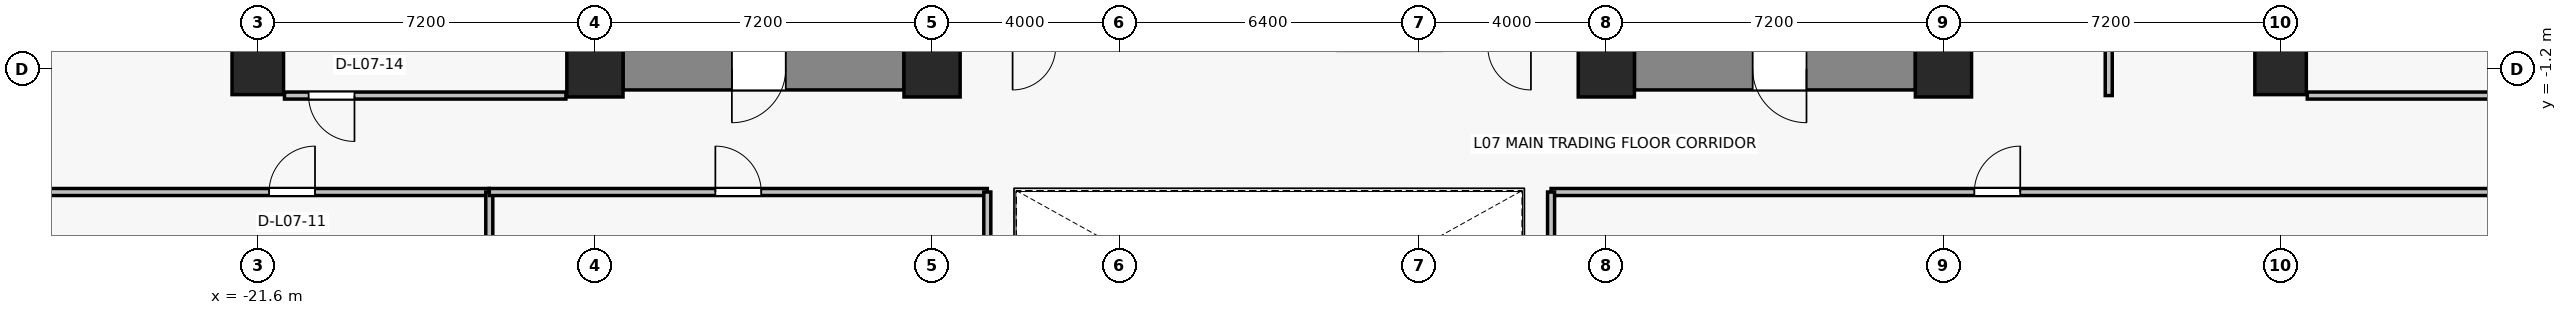
"""IFC4 building model, lengths in metres.
Left out: names, types, materials, properties, quantities, classifications, styles, units other than length and angle.
Written with IfcOpenShell. Run it as: python <this file> out.ifc"""

import sys

from ifc_helpers import new_model, si_unit, direction, frame, frame_2d, origin, origin_2d, place, context, subcontext, project, spatial, rectangle, extrude, source, transform, mapped, element, fill, save


model = new_model("IFC4")
c1 = context("Model", 3, precision=1e-05, world=origin(), true_north=direction((0.0, 1.0)))
c2 = subcontext(c1, "Body", "Model", "MODEL_VIEW")
j1 = project(units=[si_unit("LENGTHUNIT", "METRE"), si_unit("PLANEANGLEUNIT", "RADIAN")], contexts=[c1])
p1 = place(None, origin())
s1 = spatial("IfcSite", under=j1, at=p1, CompositionType="ELEMENT")
p2 = place(p1, origin())
s2 = spatial("IfcBuilding", under=s1, at=p2, CompositionType="ELEMENT")
p3 = place(p2, frame((0.0, 0.0, 30.7)))
s3 = spatial("IfcBuildingStorey", under=s2, at=p3, CompositionType="ELEMENT", Elevation=30.7)
for number, where, z_axis, x_axis in (
    (1, (-14.4, -1.2, 0.0), (0.0, 0.0, 1.0), (1.0, 0.0, 0.0)),
    (2, (-7.2, -1.2, 0.0), (0.0, 0.0, 1.0), (1.0, 0.0, 0.0)),
    (3, (7.2, -1.2, 0.0), (0.0, 0.0, 1.0), (1.0, 0.0, 0.0)),
    (4, (14.4, -1.2, 0.0), (0.0, 0.0, 1.0), (1.0, 0.0, 0.0)),
):
    element("IfcColumn", number, at=place(p3, frame(where, z_axis=z_axis, x_axis=x_axis)), inside=s3, PredefinedType="COLUMN", context=c2, shape_type="SweptSolid", body=[
        extrude(rectangle(XDim=1.2, YDim=1.2, at=origin_2d()), origin(), (0.0, 0.0, 1.0), 3.3),
    ])
for number, where, z_axis, x_axis in (
    (5, (-21.6, -1.2, 0.0), (0.0, 0.0, 1.0), (1.0, 0.0, 0.0)),
    (6, (21.6, -1.2, 0.0), (0.0, 0.0, 1.0), (1.0, 0.0, 0.0)),
):
    element("IfcColumn", number, at=place(p3, frame(where, z_axis=z_axis, x_axis=x_axis)), inside=s3, PredefinedType="COLUMN", context=c2, shape_type="SweptSolid", body=[
        extrude(rectangle(XDim=1.1, YDim=1.1, at=origin_2d()), origin(), (0.0, 0.0, 1.0), 3.3),
    ])
p4 = place(p3, frame((-7.8, -1.2, 0.0), z_axis=(0.0, 0.0, 1.0), x_axis=(-1.0, 0.0, 0.0)))
e7 = element("IfcWall", 7, at=p4, inside=s3, PredefinedType="SHEAR", context=c2, shape_type="SweptSolid", body=[
    extrude(rectangle(XDim=6.0, YDim=0.9, at=frame_2d((3.0, 0.0))), origin(), (0.0, 0.0, 1.0), 3.075),
])
p5 = place(p4, frame((2.525, 0.0, 0.0)))
e8 = element("IfcOpeningElement", 8, at=p5, cuts=e7, PredefinedType="OPENING", context=c2, shape_type="SweptSolid", body=[
    extrude(rectangle(XDim=1.15, YDim=2.15, at=frame_2d((0.575, 1.075))), frame((0.0, 0.46, 0.0), z_axis=(0.0, -1.0, 0.0), x_axis=(1.0, 0.0, 0.0)), (0.0, 0.0, 1.0), 0.92),
])
p6 = place(p3, frame((13.8, -1.2, 0.0), z_axis=(0.0, 0.0, 1.0), x_axis=(-1.0, 0.0, 0.0)))
e9 = element("IfcWall", 9, at=p6, inside=s3, PredefinedType="SHEAR", context=c2, shape_type="SweptSolid", body=[
    extrude(rectangle(XDim=6.0, YDim=0.9, at=frame_2d((3.0, 0.0))), origin(), (0.0, 0.0, 1.0), 3.075),
])
p7 = place(p6, frame((2.325, 0.0, 0.0)))
e10 = element("IfcOpeningElement", 10, at=p7, cuts=e9, PredefinedType="OPENING", context=c2, shape_type="SweptSolid", body=[
    extrude(rectangle(XDim=1.15, YDim=2.15, at=frame_2d((0.575, 1.075))), frame((0.0, 0.46, 0.0), z_axis=(0.0, -1.0, 0.0), x_axis=(1.0, 0.0, 0.0)), (0.0, 0.0, 1.0), 0.92),
])
p8 = place(p3, frame((-32.53, -3.83, 0.0), z_axis=(0.0, 0.0, 1.0), x_axis=(1.0, 0.0, 0.0)))
e11 = element("IfcWall", 11, at=p8, inside=s3, PredefinedType="PARTITIONING", context=c2, shape_type="SweptSolid", body=[
    extrude(rectangle(XDim=15.874, YDim=0.15, at=frame_2d((7.937, 0.0))), origin(), (0.0, 0.0, 1.0), 2.465),
])
p9 = place(p8, frame((11.172, 0.0, 0.0)))
e12 = element("IfcOpeningElement", 12, at=p9, cuts=e11, PredefinedType="OPENING", context=c2, shape_type="SweptSolid", body=[
    extrude(rectangle(XDim=0.98, YDim=2.15, at=frame_2d((0.49, 1.075))), frame((0.0, 0.085, 0.0), z_axis=(0.0, -1.0, 0.0), x_axis=(1.0, 0.0, 0.0)), (0.0, 0.0, 1.0), 0.17),
])
p10 = place(p3, frame((-16.656, -3.83, 0.0), z_axis=(0.0, 0.0, 1.0), x_axis=(0.0, -1.0, 0.0)))
e13 = element("IfcWall", 13, at=p10, inside=s3, PredefinedType="PARTITIONING", context=c2, shape_type="SweptSolid", body=[
    extrude(rectangle(XDim=14.3, YDim=0.15, at=frame_2d((7.15, 0.0))), origin(), (0.0, 0.0, 1.0), 2.465),
])
p11 = place(p3, frame((-16.656, -3.83, 0.0), z_axis=(0.0, 0.0, 1.0), x_axis=(1.0, 0.0, 0.0)))
e14 = element("IfcWall", 14, at=p11, inside=s3, PredefinedType="PARTITIONING", context=c2, shape_type="SweptSolid", body=[
    extrude(rectangle(XDim=10.636, YDim=0.15, at=frame_2d((5.318, 0.0))), origin(), (0.0, 0.0, 1.0), 2.465),
])
p12 = place(p11, frame((4.828, 0.0, 0.0)))
e15 = element("IfcOpeningElement", 15, at=p12, cuts=e14, PredefinedType="OPENING", context=c2, shape_type="SweptSolid", body=[
    extrude(rectangle(XDim=0.98, YDim=2.15, at=frame_2d((0.49, 1.075))), frame((0.0, 0.085, 0.0), z_axis=(0.0, -1.0, 0.0), x_axis=(1.0, 0.0, 0.0)), (0.0, 0.0, 1.0), 0.17),
])
p13 = place(p3, frame((-6.02, -3.83, 0.0), z_axis=(0.0, 0.0, 1.0), x_axis=(0.0, -1.0, 0.0)))
e16 = element("IfcWall", 16, at=p13, inside=s3, PredefinedType="PARTITIONING", context=c2, shape_type="SweptSolid", body=[
    extrude(rectangle(XDim=14.3, YDim=0.15, at=frame_2d((7.15, 0.0))), origin(), (0.0, 0.0, 1.0), 2.465),
])
p14 = place(p3, frame((6.02, -3.83, 0.0), z_axis=(0.0, 0.0, 1.0), x_axis=(1.0, 0.0, 0.0)))
e17 = element("IfcWall", 17, at=p14, inside=s3, PredefinedType="PARTITIONING", context=c2, shape_type="SweptSolid", body=[
    extrude(rectangle(XDim=22.51, YDim=0.15, at=frame_2d((11.255, 0.0))), origin(), (0.0, 0.0, 1.0), 2.465),
])
p15 = place(p14, frame((9.04, 0.0, 0.0)))
e18 = element("IfcOpeningElement", 18, at=p15, cuts=e17, PredefinedType="OPENING", context=c2, shape_type="SweptSolid", body=[
    extrude(rectangle(XDim=0.98, YDim=2.15, at=frame_2d((0.49, 1.075))), frame((0.0, 0.085, 0.0), z_axis=(0.0, -1.0, 0.0), x_axis=(1.0, 0.0, 0.0)), (0.0, 0.0, 1.0), 0.17),
])
p16 = place(p3, frame((6.02, -18.13, 0.0), z_axis=(0.0, 0.0, 1.0), x_axis=(0.0, 1.0, 0.0)))
e19 = element("IfcWall", 19, at=p16, inside=s3, PredefinedType="PARTITIONING", context=c2, shape_type="SweptSolid", body=[
    extrude(rectangle(XDim=14.3, YDim=0.15, at=frame_2d((7.15, 0.0))), origin(), (0.0, 0.0, 1.0), 2.465),
])
p17 = place(p3, frame((-15.02, -1.77, 0.0), z_axis=(0.0, 0.0, 1.0), x_axis=(-1.0, 0.0, 0.0)))
e20 = element("IfcWall", 20, at=p17, inside=s3, PredefinedType="PARTITIONING", context=c2, shape_type="SweptSolid", body=[
    extrude(rectangle(XDim=6.01, YDim=0.15, at=frame_2d((3.005, 0.0))), origin(), (0.0, 0.0, 1.0), 3.075),
])
p18 = place(p17, frame((4.515, 0.0, 0.0)))
e21 = element("IfcOpeningElement", 21, at=p18, cuts=e20, PredefinedType="OPENING", context=c2, shape_type="SweptSolid", body=[
    extrude(rectangle(XDim=0.98, YDim=2.15, at=frame_2d((0.49, 1.075))), frame((0.0, 0.085, 0.0), z_axis=(0.0, -1.0, 0.0), x_axis=(1.0, 0.0, 0.0)), (0.0, 0.0, 1.0), 0.17),
])
p19 = place(p3, frame((28.53, -1.77, 0.0), z_axis=(0.0, 0.0, 1.0), x_axis=(-1.0, 0.0, 0.0)))
e22 = element("IfcWall", 22, at=p19, inside=s3, PredefinedType="PARTITIONING", context=c2, shape_type="SweptSolid", body=[
    extrude(rectangle(XDim=6.36, YDim=0.15, at=frame_2d((3.18, 0.0))), origin(), (0.0, 0.0, 1.0), 2.465),
])
p20 = place(p3, frame((17.93, -1.77, 0.0), z_axis=(0.0, 0.0, 1.0), x_axis=(0.0, 1.0, 0.0)))
e23 = element("IfcWall", 23, at=p20, inside=s3, PredefinedType="PARTITIONING", context=c2, shape_type="SweptSolid", body=[
    extrude(rectangle(XDim=6.292, YDim=0.15, at=frame_2d((3.146, 0.0))), origin(), (0.0, 0.0, 1.0), 2.465),
])
p21 = place(p20, frame((2.656, 0.0, 0.0)))
e24 = element("IfcOpeningElement", 24, at=p21, cuts=e23, PredefinedType="OPENING", context=c2, shape_type="SweptSolid", body=[
    extrude(rectangle(XDim=0.98, YDim=2.15, at=frame_2d((0.49, 1.075))), frame((0.0, 0.085, 0.0), z_axis=(0.0, -1.0, 0.0), x_axis=(1.0, 0.0, 0.0)), (0.0, 0.0, 1.0), 0.17),
])
m1 = source(origin(), c2, "Body", "SweptSolid", [
    extrude(rectangle(XDim=1.15, YDim=2.15, at=frame_2d((0.575, 1.075))), frame((0.0, 0.025, 0.0), z_axis=(0.0, -1.0, 0.0), x_axis=(1.0, 0.0, 0.0)), (0.0, 0.0, 1.0), 0.05),
])
p22 = place(p5, origin())
e25 = element("IfcDoor", 25, at=p22, inside=s3, OperationType="SINGLE_SWING_RIGHT", PredefinedType="DOOR", context=c2, shape_type="MappedRepresentation", body=[
    mapped(m1, transform((0.0, 0.0, 0.0), x_axis=(1.0, 0.0, 0.0), y_axis=(0.0, 1.0, 0.0), z_axis=(0.0, 0.0, 1.0), scale=1.0)),
])
fill(e8, e25)
p23 = place(p7, origin())
e26 = element("IfcDoor", 26, at=p23, inside=s3, OperationType="SINGLE_SWING_LEFT", PredefinedType="DOOR", context=c2, shape_type="MappedRepresentation", body=[
    mapped(m1, transform((0.0, 0.0, 0.0), x_axis=(1.0, 0.0, 0.0), y_axis=(0.0, 1.0, 0.0), z_axis=(0.0, 0.0, 1.0), scale=1.0)),
])
fill(e10, e26)
m2 = source(origin(), c2, "Body", "SweptSolid", [
    extrude(rectangle(XDim=0.98, YDim=2.15, at=frame_2d((0.49, 1.075))), frame((0.0, 0.025, 0.0), z_axis=(0.0, -1.0, 0.0), x_axis=(1.0, 0.0, 0.0)), (0.0, 0.0, 1.0), 0.05),
])
p24 = place(p9, origin())
e27 = element("IfcDoor", 27, at=p24, inside=s3, OperationType="SINGLE_SWING_RIGHT", PredefinedType="DOOR", context=c2, shape_type="MappedRepresentation", body=[
    mapped(m2, transform((0.0, 0.0, 0.0), x_axis=(1.0, 0.0, 0.0), y_axis=(0.0, 1.0, 0.0), z_axis=(0.0, 0.0, 1.0), scale=1.0)),
])
fill(e12, e27)
p25 = place(p12, origin())
e28 = element("IfcDoor", 28, at=p25, inside=s3, OperationType="SINGLE_SWING_LEFT", PredefinedType="DOOR", context=c2, shape_type="MappedRepresentation", body=[
    mapped(m2, transform((0.0, 0.0, 0.0), x_axis=(1.0, 0.0, 0.0), y_axis=(0.0, 1.0, 0.0), z_axis=(0.0, 0.0, 1.0), scale=1.0)),
])
fill(e15, e28)
p26 = place(p15, origin())
e29 = element("IfcDoor", 29, at=p26, inside=s3, OperationType="SINGLE_SWING_RIGHT", PredefinedType="DOOR", context=c2, shape_type="MappedRepresentation", body=[
    mapped(m2, transform((0.0, 0.0, 0.0), x_axis=(1.0, 0.0, 0.0), y_axis=(0.0, 1.0, 0.0), z_axis=(0.0, 0.0, 1.0), scale=1.0)),
])
fill(e18, e29)
p27 = place(p18, origin())
e30 = element("IfcDoor", 30, at=p27, inside=s3, OperationType="SINGLE_SWING_LEFT", PredefinedType="DOOR", context=c2, shape_type="MappedRepresentation", body=[
    mapped(m2, transform((0.0, 0.0, 0.0), x_axis=(1.0, 0.0, 0.0), y_axis=(0.0, 1.0, 0.0), z_axis=(0.0, 0.0, 1.0), scale=1.0)),
])
fill(e21, e30)
save(model, sys.argv[1])
